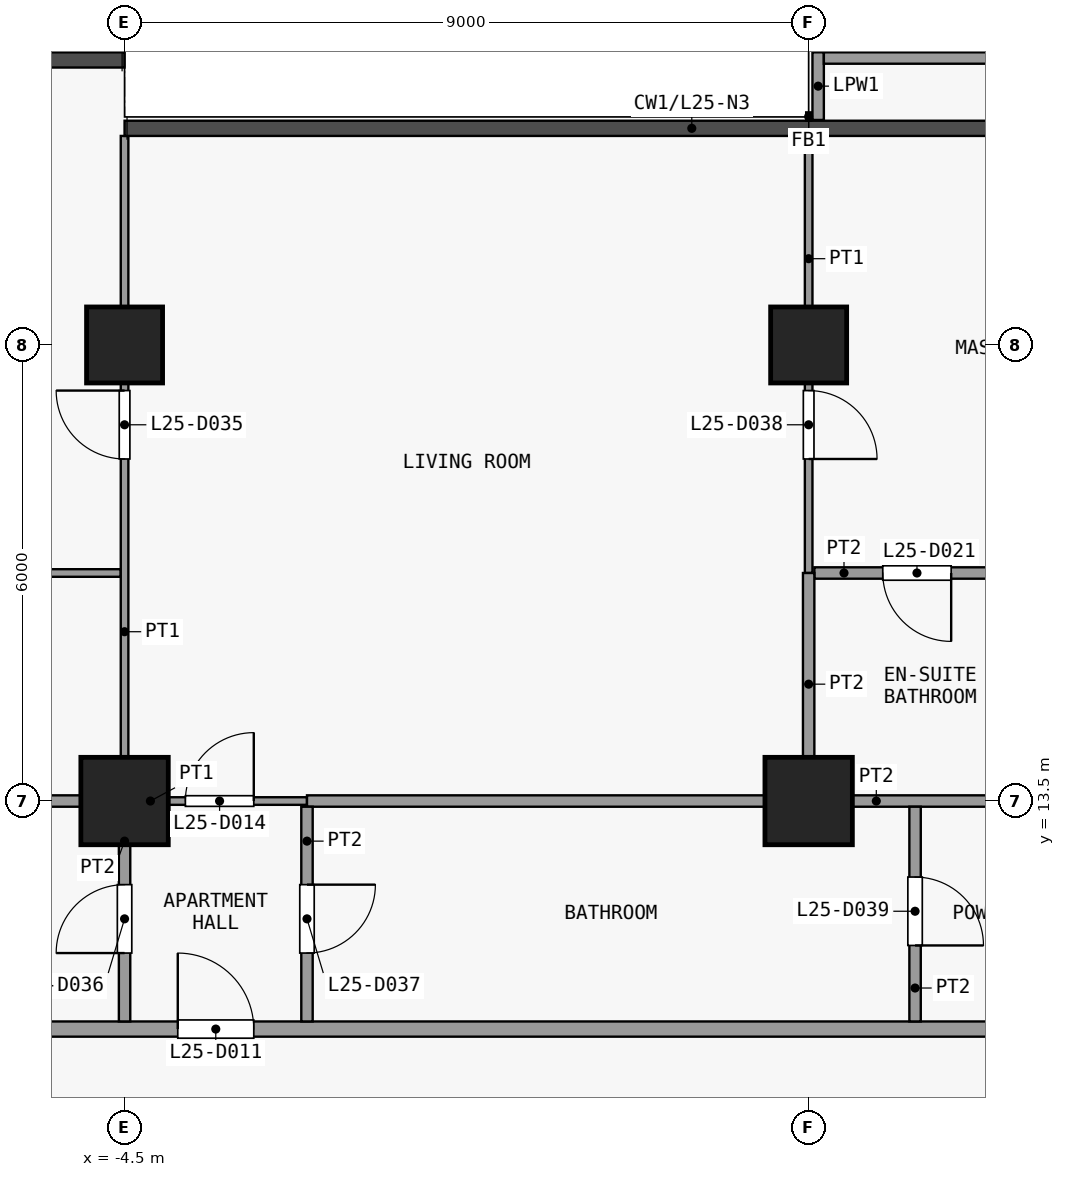
"""IFC4 building model, lengths in metres.
Left out: names, types, materials, properties, quantities, classifications, styles, units other than length and angle.
Written with IfcOpenShell. Run it as: python <this file> out.ifc"""

import sys

from ifc_helpers import new_model, si_unit, direction, frame, frame_2d, origin, origin_2d, place, context, subcontext, project, spatial, rectangle, extrude, element, fill, save


model = new_model("IFC4")
c1 = context("Model", 3, precision=1e-05, world=origin(), true_north=direction((0.0, 1.0)))
c2 = subcontext(c1, "Body", "Model", "MODEL_VIEW")
j1 = project(units=[si_unit("LENGTHUNIT", "METRE"), si_unit("PLANEANGLEUNIT", "RADIAN")], contexts=[c1])
p1 = place(None, origin())
s1 = spatial("IfcSite", under=j1, at=p1, CompositionType="ELEMENT")
p2 = place(p1, origin())
s2 = spatial("IfcBuilding", under=s1, at=p2, CompositionType="ELEMENT")
p3 = place(p2, frame((0.0, 0.0, 102.7)))
s3 = spatial("IfcBuildingStorey", under=s2, at=p3, CompositionType="ELEMENT", Elevation=102.7)
p4 = place(p3, frame((-4.5, 13.5, 0.0), z_axis=(0.0, 0.0, 1.0), x_axis=(1.0, 0.0, 0.0)))
e1 = element("IfcColumn", 1, at=p4, inside=s3, PredefinedType="COLUMN", context=c2, shape_type="SweptSolid", body=[
    extrude(rectangle(XDim=1.15, YDim=1.15, at=origin_2d()), origin(), (0.0, 0.0, 1.0), 3.6),
])
p5 = place(p3, frame((-4.5, 19.5, 0.0), z_axis=(0.0, 0.0, 1.0), x_axis=(1.0, 0.0, 0.0)))
e2 = element("IfcColumn", 2, at=p5, inside=s3, PredefinedType="COLUMN", context=c2, shape_type="SweptSolid", body=[
    extrude(rectangle(XDim=1.0, YDim=1.0, at=origin_2d()), origin(), (0.0, 0.0, 1.0), 3.6),
])
p6 = place(p3, frame((4.5, 13.5, 0.0), z_axis=(0.0, 0.0, 1.0), x_axis=(1.0, 0.0, 0.0)))
e3 = element("IfcColumn", 3, at=p6, inside=s3, PredefinedType="COLUMN", context=c2, shape_type="SweptSolid", body=[
    extrude(rectangle(XDim=1.15, YDim=1.15, at=origin_2d()), origin(), (0.0, 0.0, 1.0), 3.6),
])
p7 = place(p3, frame((4.5, 19.5, 0.0), z_axis=(0.0, 0.0, 1.0), x_axis=(1.0, 0.0, 0.0)))
e4 = element("IfcColumn", 4, at=p7, inside=s3, PredefinedType="COLUMN", context=c2, shape_type="SweptSolid", body=[
    extrude(rectangle(XDim=1.0, YDim=1.0, at=origin_2d()), origin(), (0.0, 0.0, 1.0), 3.6),
])
p8 = place(p3, frame((4.625, 22.46, 0.0), z_axis=(0.0, 0.0, 1.0), x_axis=(0.0, 1.0, 0.0)))
e5 = element("IfcWall", 5, at=p8, inside=s3, PredefinedType="PARAPET", context=c2, shape_type="SweptSolid", body=[
    extrude(rectangle(XDim=0.89, YDim=0.15, at=frame_2d((0.445, 0.0))), origin(), (0.0, 0.0, 1.0), 1.15),
])
p9 = place(p3, frame((4.7, 23.275, 0.0), z_axis=(0.0, 0.0, 1.0), x_axis=(1.0, 0.0, 0.0)))
e6 = element("IfcWall", 6, at=p9, inside=s3, PredefinedType="PARAPET", context=c2, shape_type="SweptSolid", body=[
    extrude(rectangle(XDim=5.75, YDim=0.15, at=frame_2d((2.875, 0.0))), origin(), (0.0, 0.0, 1.0), 1.15),
])
p10 = place(p3, frame((-25.35, 10.5, 0.0), z_axis=(0.0, 0.0, 1.0), x_axis=(1.0, 0.0, 0.0)))
e7 = element("IfcWall", 7, at=p10, inside=s3, PredefinedType="PARTITIONING", context=c2, shape_type="SweptSolid", body=[
    extrude(rectangle(XDim=50.7, YDim=0.2, at=frame_2d((25.35, 0.0))), origin(), (0.0, 0.0, 1.0), 3.3),
])
p11 = place(p10, frame((7.05, 0.0, 0.0)))
e8 = element("IfcOpeningElement", 8, at=p11, cuts=e7, PredefinedType="OPENING", context=c2, shape_type="SweptSolid", body=[
    extrude(rectangle(XDim=1.0, YDim=2.1, at=frame_2d((0.5, 1.05))), frame((0.0, 0.11, 0.0), z_axis=(0.0, -1.0, 0.0), x_axis=(1.0, 0.0, 0.0)), (0.0, 0.0, 1.0), 0.22),
])
p12 = place(p10, frame((21.55, 0.0, 0.0)))
e9 = element("IfcOpeningElement", 9, at=p12, cuts=e7, PredefinedType="OPENING", context=c2, shape_type="SweptSolid", body=[
    extrude(rectangle(XDim=1.0, YDim=2.1, at=frame_2d((0.5, 1.05))), frame((0.0, 0.11, 0.0), z_axis=(0.0, -1.0, 0.0), x_axis=(1.0, 0.0, 0.0)), (0.0, 0.0, 1.0), 0.22),
])
p13 = place(p10, frame((45.05, 0.0, 0.0)))
e10 = element("IfcOpeningElement", 10, at=p13, cuts=e7, PredefinedType="OPENING", context=c2, shape_type="SweptSolid", body=[
    extrude(rectangle(XDim=1.0, YDim=2.1, at=frame_2d((0.5, 1.05))), frame((0.0, 0.11, 0.0), z_axis=(0.0, -1.0, 0.0), x_axis=(1.0, 0.0, 0.0)), (0.0, 0.0, 1.0), 0.22),
])
p14 = place(p3, frame((-4.5, 13.5, 0.0), z_axis=(0.0, 0.0, 1.0), x_axis=(1.0, 0.0, 0.0)))
e11 = element("IfcWall", 11, at=p14, inside=s3, PredefinedType="PARTITIONING", context=c2, shape_type="SweptSolid", body=[
    extrude(rectangle(XDim=2.4, YDim=0.1, at=frame_2d((1.2, 0.0))), origin(), (0.0, 0.0, 1.0), 3.3),
])
p15 = place(p14, frame((0.8, 0.0, 0.0)))
e12 = element("IfcOpeningElement", 12, at=p15, cuts=e11, PredefinedType="OPENING", context=c2, shape_type="SweptSolid", body=[
    extrude(rectangle(XDim=0.9, YDim=2.1, at=frame_2d((0.45, 1.05))), frame((0.0, 0.06, 0.0), z_axis=(0.0, -1.0, 0.0), x_axis=(1.0, 0.0, 0.0)), (0.0, 0.0, 1.0), 0.12),
])
p16 = place(p3, frame((-9.075, 13.5, 0.0), z_axis=(0.0, 0.0, 1.0), x_axis=(1.0, 0.0, 0.0)))
e13 = element("IfcWall", 13, at=p16, inside=s3, PredefinedType="PARTITIONING", context=c2, shape_type="SweptSolid", body=[
    extrude(rectangle(XDim=4.575, YDim=0.15, at=frame_2d((2.288, 0.0))), origin(), (0.0, 0.0, 1.0), 3.3),
])
p17 = place(p3, frame((-2.1, 13.5, 0.0), z_axis=(0.0, 0.0, 1.0), x_axis=(1.0, 0.0, 0.0)))
e14 = element("IfcWall", 14, at=p17, inside=s3, PredefinedType="PARTITIONING", context=c2, shape_type="SweptSolid", body=[
    extrude(rectangle(XDim=21.1, YDim=0.15, at=frame_2d((10.55, 0.0))), origin(), (0.0, 0.0, 1.0), 3.3),
])
p18 = place(p17, frame((15.1, 0.0, 0.0)))
e15 = element("IfcOpeningElement", 15, at=p18, cuts=e14, PredefinedType="OPENING", context=c2, shape_type="SweptSolid", body=[
    extrude(rectangle(XDim=0.9, YDim=2.1, at=frame_2d((0.45, 1.05))), frame((0.0, 0.085, 0.0), z_axis=(0.0, -1.0, 0.0), x_axis=(1.0, 0.0, 0.0)), (0.0, 0.0, 1.0), 0.17),
])
p19 = place(p3, frame((-10.4, 16.5, 0.0), z_axis=(0.0, 0.0, 1.0), x_axis=(1.0, 0.0, 0.0)))
e16 = element("IfcWall", 16, at=p19, inside=s3, PredefinedType="PARTITIONING", context=c2, shape_type="SweptSolid", body=[
    extrude(rectangle(XDim=5.85, YDim=0.1, at=frame_2d((2.925, 0.0))), origin(), (0.0, 0.0, 1.0), 3.3),
])
p20 = place(p19, frame((2.5, 0.0, 0.0)))
e17 = element("IfcOpeningElement", 17, at=p20, cuts=e16, PredefinedType="OPENING", context=c2, shape_type="SweptSolid", body=[
    extrude(rectangle(XDim=0.9, YDim=2.1, at=frame_2d((0.45, 1.05))), frame((0.0, 0.06, 0.0), z_axis=(0.0, -1.0, 0.0), x_axis=(1.0, 0.0, 0.0)), (0.0, 0.0, 1.0), 0.12),
])
p21 = place(p3, frame((4.575, 16.5, 0.0), z_axis=(0.0, 0.0, 1.0), x_axis=(1.0, 0.0, 0.0)))
e18 = element("IfcWall", 18, at=p21, inside=s3, PredefinedType="PARTITIONING", context=c2, shape_type="SweptSolid", body=[
    extrude(rectangle(XDim=2.625, YDim=0.15, at=frame_2d((1.312, 0.0))), origin(), (0.0, 0.0, 1.0), 3.3),
])
p22 = place(p21, frame((0.9, 0.0, 0.0)))
e19 = element("IfcOpeningElement", 19, at=p22, cuts=e18, PredefinedType="OPENING", context=c2, shape_type="SweptSolid", body=[
    extrude(rectangle(XDim=0.9, YDim=2.1, at=frame_2d((0.45, 1.05))), frame((0.0, 0.085, 0.0), z_axis=(0.0, -1.0, 0.0), x_axis=(1.0, 0.0, 0.0)), (0.0, 0.0, 1.0), 0.17),
])
p23 = place(p3, frame((-4.5, 13.575, 0.0), z_axis=(0.0, 0.0, 1.0), x_axis=(0.0, 1.0, 0.0)))
e20 = element("IfcWall", 20, at=p23, inside=s3, PredefinedType="PARTITIONING", context=c2, shape_type="SweptSolid", body=[
    extrude(rectangle(XDim=8.675, YDim=0.1, at=frame_2d((4.337, 0.0))), origin(), (0.0, 0.0, 1.0), 3.3),
])
p24 = place(p23, frame((4.425, 0.0, 0.0)))
e21 = element("IfcOpeningElement", 21, at=p24, cuts=e20, PredefinedType="OPENING", context=c2, shape_type="SweptSolid", body=[
    extrude(rectangle(XDim=0.9, YDim=2.1, at=frame_2d((0.45, 1.05))), frame((0.0, 0.06, 0.0), z_axis=(0.0, -1.0, 0.0), x_axis=(1.0, 0.0, 0.0)), (0.0, 0.0, 1.0), 0.12),
])
p25 = place(p3, frame((-4.5, 10.6, 0.0), z_axis=(0.0, 0.0, 1.0), x_axis=(0.0, 1.0, 0.0)))
e22 = element("IfcWall", 22, at=p25, inside=s3, PredefinedType="PARTITIONING", context=c2, shape_type="SweptSolid", body=[
    extrude(rectangle(XDim=2.825, YDim=0.15, at=frame_2d((1.413, 0.0))), origin(), (0.0, 0.0, 1.0), 3.3),
])
p26 = place(p25, frame((0.9, 0.0, 0.0)))
e23 = element("IfcOpeningElement", 23, at=p26, cuts=e22, PredefinedType="OPENING", context=c2, shape_type="SweptSolid", body=[
    extrude(rectangle(XDim=0.9, YDim=2.1, at=frame_2d((0.45, 1.05))), frame((0.0, 0.085, 0.0), z_axis=(0.0, -1.0, 0.0), x_axis=(1.0, 0.0, 0.0)), (0.0, 0.0, 1.0), 0.17),
])
p27 = place(p3, frame((-2.1, 10.6, 0.0), z_axis=(0.0, 0.0, 1.0), x_axis=(0.0, 1.0, 0.0)))
e24 = element("IfcWall", 24, at=p27, inside=s3, PredefinedType="PARTITIONING", context=c2, shape_type="SweptSolid", body=[
    extrude(rectangle(XDim=2.825, YDim=0.15, at=frame_2d((1.413, 0.0))), origin(), (0.0, 0.0, 1.0), 3.3),
])
p28 = place(p27, frame((0.9, 0.0, 0.0)))
e25 = element("IfcOpeningElement", 25, at=p28, cuts=e24, PredefinedType="OPENING", context=c2, shape_type="SweptSolid", body=[
    extrude(rectangle(XDim=0.9, YDim=2.1, at=frame_2d((0.45, 1.05))), frame((0.0, 0.085, 0.0), z_axis=(0.0, -1.0, 0.0), x_axis=(1.0, 0.0, 0.0)), (0.0, 0.0, 1.0), 0.17),
])
p29 = place(p3, frame((4.5, 16.5, 0.0), z_axis=(0.0, 0.0, 1.0), x_axis=(0.0, 1.0, 0.0)))
e26 = element("IfcWall", 26, at=p29, inside=s3, PredefinedType="PARTITIONING", context=c2, shape_type="SweptSolid", body=[
    extrude(rectangle(XDim=5.75, YDim=0.1, at=frame_2d((2.875, 0.0))), origin(), (0.0, 0.0, 1.0), 3.3),
])
p30 = place(p29, frame((1.5, 0.0, 0.0)))
e27 = element("IfcOpeningElement", 27, at=p30, cuts=e26, PredefinedType="OPENING", context=c2, shape_type="SweptSolid", body=[
    extrude(rectangle(XDim=0.9, YDim=2.1, at=frame_2d((0.45, 1.05))), frame((0.0, 0.06, 0.0), z_axis=(0.0, -1.0, 0.0), x_axis=(1.0, 0.0, 0.0)), (0.0, 0.0, 1.0), 0.12),
])
p31 = place(p3, frame((4.5, 13.575, 0.0), z_axis=(0.0, 0.0, 1.0), x_axis=(0.0, 1.0, 0.0)))
e28 = element("IfcWall", 28, at=p31, inside=s3, PredefinedType="PARTITIONING", context=c2, shape_type="SweptSolid", body=[
    extrude(rectangle(XDim=2.925, YDim=0.15, at=frame_2d((1.462, 0.0))), origin(), (0.0, 0.0, 1.0), 3.3),
])
p32 = place(p3, frame((5.9, 10.6, 0.0), z_axis=(0.0, 0.0, 1.0), x_axis=(0.0, 1.0, 0.0)))
e29 = element("IfcWall", 29, at=p32, inside=s3, PredefinedType="PARTITIONING", context=c2, shape_type="SweptSolid", body=[
    extrude(rectangle(XDim=2.825, YDim=0.15, at=frame_2d((1.413, 0.0))), origin(), (0.0, 0.0, 1.0), 3.3),
])
p33 = place(p32, frame((1.0, 0.0, 0.0)))
e30 = element("IfcOpeningElement", 30, at=p33, cuts=e29, PredefinedType="OPENING", context=c2, shape_type="SweptSolid", body=[
    extrude(rectangle(XDim=0.9, YDim=2.1, at=frame_2d((0.45, 1.05))), frame((0.0, 0.085, 0.0), z_axis=(0.0, -1.0, 0.0), x_axis=(1.0, 0.0, 0.0)), (0.0, 0.0, 1.0), 0.17),
])
p34 = place(p12, origin())
e31 = element("IfcDoor", 31, at=p34, inside=s3, OperationType="SINGLE_SWING_RIGHT", PredefinedType="DOOR", context=c2, shape_type="SweptSolid", body=[
    extrude(rectangle(XDim=1.0, YDim=2.1, at=frame_2d((0.5, 1.05))), frame((0.0, 0.025, 0.0), z_axis=(0.0, -1.0, 0.0), x_axis=(1.0, 0.0, 0.0)), (0.0, 0.0, 1.0), 0.05),
])
fill(e9, e31)
p35 = place(p15, origin())
e32 = element("IfcDoor", 32, at=p35, inside=s3, OperationType="SINGLE_SWING_LEFT", PredefinedType="DOOR", context=c2, shape_type="SweptSolid", body=[
    extrude(rectangle(XDim=0.9, YDim=2.1, at=frame_2d((0.45, 1.05))), frame((0.0, 0.025, 0.0), z_axis=(0.0, -1.0, 0.0), x_axis=(1.0, 0.0, 0.0)), (0.0, 0.0, 1.0), 0.05),
])
fill(e12, e32)
p36 = place(p22, origin())
e33 = element("IfcDoor", 33, at=p36, inside=s3, OperationType="SINGLE_SWING_RIGHT", PredefinedType="DOOR", context=c2, shape_type="SweptSolid", body=[
    extrude(rectangle(XDim=0.9, YDim=2.1, at=frame_2d((0.45, 1.05))), frame((0.0, 0.025, 0.0), z_axis=(0.0, -1.0, 0.0), x_axis=(1.0, 0.0, 0.0)), (0.0, 0.0, 1.0), 0.05),
])
fill(e19, e33)
p37 = place(p24, origin())
e34 = element("IfcDoor", 34, at=p37, inside=s3, OperationType="SINGLE_SWING_LEFT", PredefinedType="DOOR", context=c2, shape_type="SweptSolid", body=[
    extrude(rectangle(XDim=0.9, YDim=2.1, at=frame_2d((0.45, 1.05))), frame((0.0, 0.025, 0.0), z_axis=(0.0, -1.0, 0.0), x_axis=(1.0, 0.0, 0.0)), (0.0, 0.0, 1.0), 0.05),
])
fill(e21, e34)
p38 = place(p26, origin())
e35 = element("IfcDoor", 35, at=p38, inside=s3, OperationType="SINGLE_SWING_RIGHT", PredefinedType="DOOR", context=c2, shape_type="SweptSolid", body=[
    extrude(rectangle(XDim=0.9, YDim=2.1, at=frame_2d((0.45, 1.05))), frame((0.0, 0.025, 0.0), z_axis=(0.0, -1.0, 0.0), x_axis=(1.0, 0.0, 0.0)), (0.0, 0.0, 1.0), 0.05),
])
fill(e23, e35)
p39 = place(p28, origin())
e36 = element("IfcDoor", 36, at=p39, inside=s3, OperationType="SINGLE_SWING_RIGHT", PredefinedType="DOOR", context=c2, shape_type="SweptSolid", body=[
    extrude(rectangle(XDim=0.9, YDim=2.1, at=frame_2d((0.45, 1.05))), frame((0.0, 0.025, 0.0), z_axis=(0.0, -1.0, 0.0), x_axis=(1.0, 0.0, 0.0)), (0.0, 0.0, 1.0), 0.05),
])
fill(e25, e36)
p40 = place(p30, origin())
e37 = element("IfcDoor", 37, at=p40, inside=s3, OperationType="SINGLE_SWING_LEFT", PredefinedType="DOOR", context=c2, shape_type="SweptSolid", body=[
    extrude(rectangle(XDim=0.9, YDim=2.1, at=frame_2d((0.45, 1.05))), frame((0.0, 0.025, 0.0), z_axis=(0.0, -1.0, 0.0), x_axis=(1.0, 0.0, 0.0)), (0.0, 0.0, 1.0), 0.05),
])
fill(e27, e37)
p41 = place(p33, origin())
e38 = element("IfcDoor", 38, at=p41, inside=s3, OperationType="SINGLE_SWING_LEFT", PredefinedType="DOOR", context=c2, shape_type="SweptSolid", body=[
    extrude(rectangle(XDim=0.9, YDim=2.1, at=frame_2d((0.45, 1.05))), frame((0.0, 0.025, 0.0), z_axis=(0.0, -1.0, 0.0), x_axis=(1.0, 0.0, 0.0)), (0.0, 0.0, 1.0), 0.05),
])
fill(e30, e38)
save(model, sys.argv[1])
